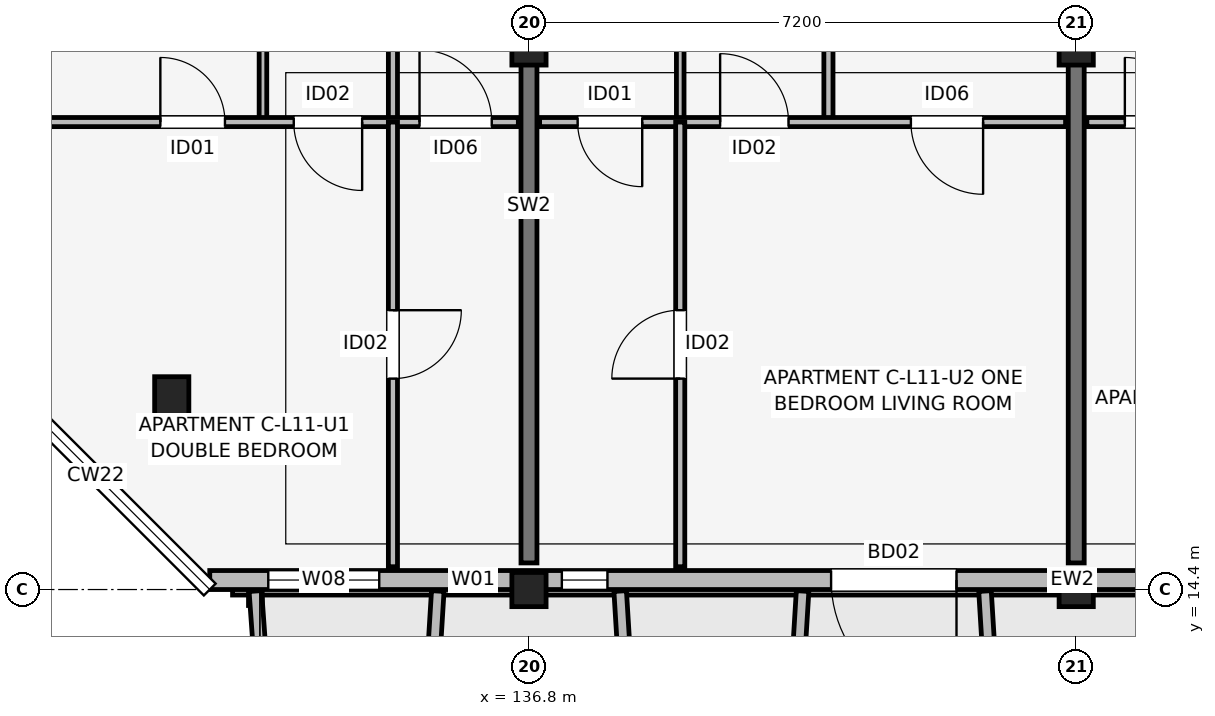
"""IFC4 building model, lengths in metres.
Left out: names, types, materials, properties, quantities, classifications, styles, units other than length and angle.
Written with IfcOpenShell. Run it as: python <this file> out.ifc"""

import sys

from ifc_helpers import new_model, si_unit, direction, frame, frame_2d, origin, origin_2d, place, context, subcontext, project, spatial, rectangle, extrude, element, fill, save


model = new_model("IFC4")
c1 = context("Model", 3, precision=1e-05, world=origin(), true_north=direction((0.0, 1.0)))
c2 = subcontext(c1, "Body", "Model", "MODEL_VIEW")
j1 = project(units=[si_unit("LENGTHUNIT", "METRE"), si_unit("PLANEANGLEUNIT", "RADIAN")], contexts=[c1])
p1 = place(None, origin())
s1 = spatial("IfcSite", under=j1, at=p1, CompositionType="ELEMENT")
p2 = place(p1, origin())
s2 = spatial("IfcBuilding", under=s1, at=p2, CompositionType="ELEMENT")
p3 = place(p2, frame((0.0, 0.0, 37.05)))
s3 = spatial("IfcBuildingStorey", under=s2, at=p3, CompositionType="ELEMENT", Elevation=37.05)
p4 = place(p3, frame((132.1, 16.9, 0.0), z_axis=(0.0, 0.0, 1.0), x_axis=(1.0, 0.0, 0.0)))
e1 = element("IfcColumn", 1, at=p4, inside=s3, PredefinedType="COLUMN", context=c2, shape_type="SweptSolid", body=[
    extrude(rectangle(XDim=0.45, YDim=0.6, at=origin_2d()), origin(), (0.0, 0.0, 1.0), 3.15),
])
p5 = place(p3, frame((136.8, 14.4, 0.0), z_axis=(0.0, 0.0, 1.0), x_axis=(1.0, 0.0, 0.0)))
e2 = element("IfcColumn", 2, at=p5, inside=s3, PredefinedType="COLUMN", context=c2, shape_type="SweptSolid", body=[
    extrude(rectangle(XDim=0.45, YDim=0.45, at=origin_2d()), origin(), (0.0, 0.0, 1.0), 3.15),
])
p6 = place(p3, frame((136.8, 21.6, 0.0), z_axis=(0.0, 0.0, 1.0), x_axis=(1.0, 0.0, 0.0)))
e3 = element("IfcColumn", 3, at=p6, inside=s3, PredefinedType="COLUMN", context=c2, shape_type="SweptSolid", body=[
    extrude(rectangle(XDim=0.45, YDim=0.6, at=origin_2d()), origin(), (0.0, 0.0, 1.0), 3.15),
])
p7 = place(p3, frame((144.0, 14.4, 0.0), z_axis=(0.0, 0.0, 1.0), x_axis=(1.0, 0.0, 0.0)))
e4 = element("IfcColumn", 4, at=p7, inside=s3, PredefinedType="COLUMN", context=c2, shape_type="SweptSolid", body=[
    extrude(rectangle(XDim=0.45, YDim=0.45, at=origin_2d()), origin(), (0.0, 0.0, 1.0), 3.15),
])
p8 = place(p3, frame((144.0, 21.6, 0.0), z_axis=(0.0, 0.0, 1.0), x_axis=(1.0, 0.0, 0.0)))
e5 = element("IfcColumn", 5, at=p8, inside=s3, PredefinedType="COLUMN", context=c2, shape_type="SweptSolid", body=[
    extrude(rectangle(XDim=0.45, YDim=0.6, at=origin_2d()), origin(), (0.0, 0.0, 1.0), 3.15),
])
for number, where, z_axis, x_axis in (
    (6, (136.8, 14.75, 0.0), (0.0, 0.0, 1.0), (0.0, 1.0, 0.0)),
    (7, (144.0, 14.75, 0.0), (0.0, 0.0, 1.0), (0.0, 1.0, 0.0)),
):
    element("IfcWall", number, at=place(p3, frame(where, z_axis=z_axis, x_axis=x_axis)), inside=s3, PredefinedType="SHEAR", context=c2, shape_type="SweptSolid", body=[
        extrude(rectangle(XDim=9.4, YDim=0.21, at=frame_2d((4.7, 0.0))), origin(), (0.0, 0.0, 1.0), 3.15),
    ])
p9 = place(p3, frame((132.6, 14.525, 0.0), z_axis=(0.0, 0.0, 1.0), x_axis=(1.0, 0.0, 0.0)))
e8 = element("IfcWall", 8, at=p9, inside=s3, PredefinedType="SOLIDWALL", context=c2, shape_type="SweptSolid", body=[
    extrude(rectangle(XDim=30.0, YDim=0.25, at=frame_2d((15.0, 0.0))), origin(), (0.0, 0.0, 1.0), 2.45),
])
p10 = place(p9, frame((9.825, 0.0, 0.0), z_axis=(0.0, 0.0, 1.0), x_axis=(-1.0, 0.0, 0.0)))
e9 = element("IfcOpeningElement", 9, at=p10, cuts=e8, PredefinedType="OPENING", context=c2, shape_type="SweptSolid", body=[
    extrude(rectangle(XDim=1.65, YDim=2.15, at=frame_2d((0.825, 1.075))), frame((0.0, 0.135, 0.0), z_axis=(0.0, -1.0, 0.0), x_axis=(1.0, 0.0, 0.0)), (0.0, 0.0, 1.0), 0.27),
])
p11 = place(p9, frame((24.15, 0.0, 0.0), z_axis=(0.0, 0.0, 1.0), x_axis=(-1.0, 0.0, 0.0)))
e10 = element("IfcOpeningElement", 10, at=p11, cuts=e8, PredefinedType="OPENING", context=c2, shape_type="SweptSolid", body=[
    extrude(rectangle(XDim=1.5, YDim=2.15, at=frame_2d((0.75, 1.075))), frame((0.0, 0.135, 0.0), z_axis=(0.0, -1.0, 0.0), x_axis=(1.0, 0.0, 0.0)), (0.0, 0.0, 1.0), 0.27),
])
p12 = place(p9, frame((0.77, 0.0, 0.7)))
e11 = element("IfcOpeningElement", 11, at=p12, cuts=e8, PredefinedType="OPENING", context=c2, shape_type="SweptSolid", body=[
    extrude(rectangle(XDim=1.46, YDim=1.55, at=frame_2d((0.73, 0.775))), frame((0.0, 0.135, 0.0), z_axis=(0.0, -1.0, 0.0), x_axis=(1.0, 0.0, 0.0)), (0.0, 0.0, 1.0), 0.27),
])
p13 = place(p9, frame((3.167, 0.0, 0.75)))
e12 = element("IfcOpeningElement", 12, at=p13, cuts=e8, PredefinedType="OPENING", context=c2, shape_type="SweptSolid", body=[
    extrude(rectangle(XDim=0.6, YDim=1.25, at=frame_2d((0.3, 0.625))), frame((0.0, 0.135, 0.0), z_axis=(0.0, -1.0, 0.0), x_axis=(1.0, 0.0, 0.0)), (0.0, 0.0, 1.0), 0.27),
])
p14 = place(p9, frame((4.633, 0.0, 0.75)))
e13 = element("IfcOpeningElement", 13, at=p14, cuts=e8, PredefinedType="OPENING", context=c2, shape_type="SweptSolid", body=[
    extrude(rectangle(XDim=0.6, YDim=1.25, at=frame_2d((0.3, 0.625))), frame((0.0, 0.135, 0.0), z_axis=(0.0, -1.0, 0.0), x_axis=(1.0, 0.0, 0.0)), (0.0, 0.0, 1.0), 0.27),
])
p15 = place(p9, frame((12.87, 0.0, 0.7)))
e14 = element("IfcOpeningElement", 14, at=p15, cuts=e8, PredefinedType="OPENING", context=c2, shape_type="SweptSolid", body=[
    extrude(rectangle(XDim=1.86, YDim=1.6, at=frame_2d((0.93, 0.8))), frame((0.0, 0.135, 0.0), z_axis=(0.0, -1.0, 0.0), x_axis=(1.0, 0.0, 0.0)), (0.0, 0.0, 1.0), 0.27),
])
p16 = place(p9, frame((16.165, 0.0, 0.75)))
e15 = element("IfcOpeningElement", 15, at=p16, cuts=e8, PredefinedType="OPENING", context=c2, shape_type="SweptSolid", body=[
    extrude(rectangle(XDim=0.72, YDim=1.35, at=frame_2d((0.36, 0.675))), frame((0.0, 0.135, 0.0), z_axis=(0.0, -1.0, 0.0), x_axis=(1.0, 0.0, 0.0)), (0.0, 0.0, 1.0), 0.27),
])
p17 = place(p9, frame((19.032, 0.0, 0.75)))
e16 = element("IfcOpeningElement", 16, at=p17, cuts=e8, PredefinedType="OPENING", context=c2, shape_type="SweptSolid", body=[
    extrude(rectangle(XDim=0.6, YDim=1.25, at=frame_2d((0.3, 0.625))), frame((0.0, 0.135, 0.0), z_axis=(0.0, -1.0, 0.0), x_axis=(1.0, 0.0, 0.0)), (0.0, 0.0, 1.0), 0.27),
])
p18 = place(p9, frame((26.232, 0.0, 0.75)))
e17 = element("IfcOpeningElement", 17, at=p18, cuts=e8, PredefinedType="OPENING", context=c2, shape_type="SweptSolid", body=[
    extrude(rectangle(XDim=0.6, YDim=1.25, at=frame_2d((0.3, 0.625))), frame((0.0, 0.135, 0.0), z_axis=(0.0, -1.0, 0.0), x_axis=(1.0, 0.0, 0.0)), (0.0, 0.0, 1.0), 0.27),
])
p19 = place(p9, frame((28.05, 0.0, 0.75)))
e18 = element("IfcOpeningElement", 18, at=p19, cuts=e8, PredefinedType="OPENING", context=c2, shape_type="SweptSolid", body=[
    extrude(rectangle(XDim=1.1, YDim=1.5, at=frame_2d((0.55, 0.75))), frame((0.0, 0.135, 0.0), z_axis=(0.0, -1.0, 0.0), x_axis=(1.0, 0.0, 0.0)), (0.0, 0.0, 1.0), 0.27),
])
p20 = place(p3, frame((133.2, 14.38, 0.0), z_axis=(0.0, 0.0, 1.0), x_axis=(0.071317687608, -0.997453651772, 0.0)))
e19 = element("IfcWall", 19, at=p20, inside=s3, PredefinedType="ELEMENTEDWALL", context=c2, shape_type="SweptSolid", body=[
    extrude(rectangle(XDim=1.965, YDim=0.165, at=frame_2d((0.982, 0.0))), origin(), (0.0, 0.0, 1.0), 2.95),
])
p21 = place(p3, frame((135.6, 14.38, 0.0), z_axis=(0.0, 0.0, 1.0), x_axis=(-0.061170732449, -0.998127317276, 0.0)))
e20 = element("IfcWall", 20, at=p21, inside=s3, PredefinedType="ELEMENTEDWALL", context=c2, shape_type="SweptSolid", body=[
    extrude(rectangle(XDim=1.964, YDim=0.165, at=frame_2d((0.982, 0.0))), origin(), (0.0, 0.0, 1.0), 2.95),
])
for number, where, z_axis, x_axis in (
    (21, (138.0, 14.38, 0.0), (0.0, 0.0, 1.0), (0.061, -0.998, 0.0)),
    (22, (140.4, 14.38, 0.0), (0.0, 0.0, 1.0), (-0.061, -0.998, 0.0)),
    (23, (142.8, 14.38, 0.0), (0.0, 0.0, 1.0), (0.061, -0.998, 0.0)),
):
    element("IfcWall", number, at=place(p3, frame(where, z_axis=z_axis, x_axis=x_axis)), inside=s3, PredefinedType="ELEMENTEDWALL", context=c2, shape_type="SweptSolid", body=[
        extrude(rectangle(XDim=1.964, YDim=0.165, at=frame_2d((0.982, 0.0))), origin(), (0.0, 0.0, 1.0), 2.55),
    ])
p22 = place(p3, frame((133.3, 20.55, 0.0), z_axis=(0.0, 0.0, 1.0), x_axis=(0.0, 1.0, 0.0)))
e24 = element("IfcWall", 24, at=p22, inside=s3, PredefinedType="PARTITIONING", context=c2, shape_type="SweptSolid", body=[
    extrude(rectangle(XDim=3.75, YDim=0.1, at=frame_2d((1.875, 0.0))), origin(), (0.0, 0.0, 1.0), 2.38),
])
p23 = place(p3, frame((135.01, 20.55, 0.0), z_axis=(0.0, 0.0, 1.0), x_axis=(0.0, 1.0, 0.0)))
e25 = element("IfcWall", 25, at=p23, inside=s3, PredefinedType="PARTITIONING", context=c2, shape_type="SweptSolid", body=[
    extrude(rectangle(XDim=3.75, YDim=0.12, at=frame_2d((1.875, 0.0))), origin(), (0.0, 0.0, 1.0), 2.38),
])
p24 = place(p3, frame((129.74, 20.55, 0.0), z_axis=(0.0, 0.0, 1.0), x_axis=(1.0, 0.0, 0.0)))
e26 = element("IfcWall", 26, at=p24, inside=s3, PredefinedType="PARTITIONING", context=c2, shape_type="SweptSolid", body=[
    extrude(rectangle(XDim=6.92, YDim=0.12, at=frame_2d((3.46, 0.0))), origin(), (0.0, 0.0, 1.0), 2.38),
])
p25 = place(p24, frame((2.21, 0.0, 0.0)))
e27 = element("IfcOpeningElement", 27, at=p25, cuts=e26, PredefinedType="OPENING", context=c2, shape_type="SweptSolid", body=[
    extrude(rectangle(XDim=0.85, YDim=2.08, at=frame_2d((0.425, 1.04))), frame((0.0, 0.07, 0.0), z_axis=(0.0, -1.0, 0.0), x_axis=(1.0, 0.0, 0.0)), (0.0, 0.0, 1.0), 0.14),
])
p26 = place(p24, frame((4.865, 0.0, 0.0), z_axis=(0.0, 0.0, 1.0), x_axis=(-1.0, 0.0, 0.0)))
e28 = element("IfcOpeningElement", 28, at=p26, cuts=e26, PredefinedType="OPENING", context=c2, shape_type="SweptSolid", body=[
    extrude(rectangle(XDim=0.9, YDim=2.08, at=frame_2d((0.45, 1.04))), frame((0.0, 0.07, 0.0), z_axis=(0.0, -1.0, 0.0), x_axis=(1.0, 0.0, 0.0)), (0.0, 0.0, 1.0), 0.14),
])
p27 = place(p24, frame((5.62, 0.0, 0.0)))
e29 = element("IfcOpeningElement", 29, at=p27, cuts=e26, PredefinedType="OPENING", context=c2, shape_type="SweptSolid", body=[
    extrude(rectangle(XDim=0.95, YDim=2.08, at=frame_2d((0.475, 1.04))), frame((0.0, 0.07, 0.0), z_axis=(0.0, -1.0, 0.0), x_axis=(1.0, 0.0, 0.0)), (0.0, 0.0, 1.0), 0.14),
])
p28 = place(p3, frame((135.01, 14.7, 0.0), z_axis=(0.0, 0.0, 1.0), x_axis=(0.0, 1.0, 0.0)))
e30 = element("IfcWall", 30, at=p28, inside=s3, PredefinedType="PARTITIONING", context=c2, shape_type="SweptSolid", body=[
    extrude(rectangle(XDim=5.85, YDim=0.12, at=frame_2d((2.925, 0.0))), origin(), (0.0, 0.0, 1.0), 2.38),
])
p29 = place(p28, frame((3.375, 0.0, 0.0), z_axis=(0.0, 0.0, 1.0), x_axis=(-1.0, 0.0, 0.0)))
e31 = element("IfcOpeningElement", 31, at=p29, cuts=e30, PredefinedType="OPENING", context=c2, shape_type="SweptSolid", body=[
    extrude(rectangle(XDim=0.9, YDim=2.08, at=frame_2d((0.45, 1.04))), frame((0.0, 0.07, 0.0), z_axis=(0.0, -1.0, 0.0), x_axis=(1.0, 0.0, 0.0)), (0.0, 0.0, 1.0), 0.14),
])
p30 = place(p3, frame((138.79, 20.55, 0.0), z_axis=(0.0, 0.0, 1.0), x_axis=(0.0, 1.0, 0.0)))
e32 = element("IfcWall", 32, at=p30, inside=s3, PredefinedType="PARTITIONING", context=c2, shape_type="SweptSolid", body=[
    extrude(rectangle(XDim=3.75, YDim=0.1, at=frame_2d((1.875, 0.0))), origin(), (0.0, 0.0, 1.0), 2.38),
])
p31 = place(p3, frame((140.74, 20.55, 0.0), z_axis=(0.0, 0.0, 1.0), x_axis=(0.0, 1.0, 0.0)))
e33 = element("IfcWall", 33, at=p31, inside=s3, PredefinedType="PARTITIONING", context=c2, shape_type="SweptSolid", body=[
    extrude(rectangle(XDim=3.75, YDim=0.12, at=frame_2d((1.875, 0.0))), origin(), (0.0, 0.0, 1.0), 2.38),
])
p32 = place(p3, frame((136.94, 20.55, 0.0), z_axis=(0.0, 0.0, 1.0), x_axis=(1.0, 0.0, 0.0)))
e34 = element("IfcWall", 34, at=p32, inside=s3, PredefinedType="PARTITIONING", context=c2, shape_type="SweptSolid", body=[
    extrude(rectangle(XDim=6.92, YDim=0.12, at=frame_2d((3.46, 0.0))), origin(), (0.0, 0.0, 1.0), 2.38),
])
p33 = place(p32, frame((1.35, 0.0, 0.0), z_axis=(0.0, 0.0, 1.0), x_axis=(-1.0, 0.0, 0.0)))
e35 = element("IfcOpeningElement", 35, at=p33, cuts=e34, PredefinedType="OPENING", context=c2, shape_type="SweptSolid", body=[
    extrude(rectangle(XDim=0.85, YDim=2.08, at=frame_2d((0.425, 1.04))), frame((0.0, 0.07, 0.0), z_axis=(0.0, -1.0, 0.0), x_axis=(1.0, 0.0, 0.0)), (0.0, 0.0, 1.0), 0.14),
])
p34 = place(p32, frame((2.375, 0.0, 0.0)))
e36 = element("IfcOpeningElement", 36, at=p34, cuts=e34, PredefinedType="OPENING", context=c2, shape_type="SweptSolid", body=[
    extrude(rectangle(XDim=0.9, YDim=2.08, at=frame_2d((0.45, 1.04))), frame((0.0, 0.07, 0.0), z_axis=(0.0, -1.0, 0.0), x_axis=(1.0, 0.0, 0.0)), (0.0, 0.0, 1.0), 0.14),
])
p35 = place(p32, frame((5.835, 0.0, 0.0), z_axis=(0.0, 0.0, 1.0), x_axis=(-1.0, 0.0, 0.0)))
e37 = element("IfcOpeningElement", 37, at=p35, cuts=e34, PredefinedType="OPENING", context=c2, shape_type="SweptSolid", body=[
    extrude(rectangle(XDim=0.95, YDim=2.08, at=frame_2d((0.475, 1.04))), frame((0.0, 0.07, 0.0), z_axis=(0.0, -1.0, 0.0), x_axis=(1.0, 0.0, 0.0)), (0.0, 0.0, 1.0), 0.14),
])
p36 = place(p3, frame((138.79, 14.7, 0.0), z_axis=(0.0, 0.0, 1.0), x_axis=(0.0, 1.0, 0.0)))
e38 = element("IfcWall", 38, at=p36, inside=s3, PredefinedType="PARTITIONING", context=c2, shape_type="SweptSolid", body=[
    extrude(rectangle(XDim=5.85, YDim=0.12, at=frame_2d((2.925, 0.0))), origin(), (0.0, 0.0, 1.0), 2.38),
])
p37 = place(p36, frame((2.475, 0.0, 0.0)))
e39 = element("IfcOpeningElement", 39, at=p37, cuts=e38, PredefinedType="OPENING", context=c2, shape_type="SweptSolid", body=[
    extrude(rectangle(XDim=0.9, YDim=2.08, at=frame_2d((0.45, 1.04))), frame((0.0, 0.07, 0.0), z_axis=(0.0, -1.0, 0.0), x_axis=(1.0, 0.0, 0.0)), (0.0, 0.0, 1.0), 0.14),
])
p38 = place(p3, frame((144.14, 20.55, 0.0), z_axis=(0.0, 0.0, 1.0), x_axis=(1.0, 0.0, 0.0)))
e40 = element("IfcWall", 40, at=p38, inside=s3, PredefinedType="PARTITIONING", context=c2, shape_type="SweptSolid", body=[
    extrude(rectangle(XDim=6.92, YDim=0.12, at=frame_2d((3.46, 0.0))), origin(), (0.0, 0.0, 1.0), 2.38),
])
p39 = place(p38, frame((0.5, 0.0, 0.0)))
e41 = element("IfcOpeningElement", 41, at=p39, cuts=e40, PredefinedType="OPENING", context=c2, shape_type="SweptSolid", body=[
    extrude(rectangle(XDim=0.85, YDim=2.08, at=frame_2d((0.425, 1.04))), frame((0.0, 0.07, 0.0), z_axis=(0.0, -1.0, 0.0), x_axis=(1.0, 0.0, 0.0)), (0.0, 0.0, 1.0), 0.14),
])
p40 = place(p38, frame((3.425, 0.0, 0.0), z_axis=(0.0, 0.0, 1.0), x_axis=(-1.0, 0.0, 0.0)))
e42 = element("IfcOpeningElement", 42, at=p40, cuts=e40, PredefinedType="OPENING", context=c2, shape_type="SweptSolid", body=[
    extrude(rectangle(XDim=0.9, YDim=2.08, at=frame_2d((0.45, 1.04))), frame((0.0, 0.07, 0.0), z_axis=(0.0, -1.0, 0.0), x_axis=(1.0, 0.0, 0.0)), (0.0, 0.0, 1.0), 0.14),
])
p41 = place(p38, frame((5.035, 0.0, 0.0)))
e43 = element("IfcOpeningElement", 43, at=p41, cuts=e40, PredefinedType="OPENING", context=c2, shape_type="SweptSolid", body=[
    extrude(rectangle(XDim=0.95, YDim=2.08, at=frame_2d((0.475, 1.04))), frame((0.0, 0.07, 0.0), z_axis=(0.0, -1.0, 0.0), x_axis=(1.0, 0.0, 0.0)), (0.0, 0.0, 1.0), 0.14),
])
p42 = place(p10, origin())
e44 = element("IfcDoor", 44, at=p42, inside=s3, OperationType="SINGLE_SWING_RIGHT", PredefinedType="DOOR", context=c2, shape_type="SweptSolid", body=[
    extrude(rectangle(XDim=1.65, YDim=2.15, at=frame_2d((0.825, 1.075))), frame((0.0, 0.025, 0.0), z_axis=(0.0, -1.0, 0.0), x_axis=(1.0, 0.0, 0.0)), (0.0, 0.0, 1.0), 0.05),
])
fill(e9, e44)
p43 = place(p12, origin())
e45 = element("IfcWindow", 45, at=p43, inside=s3, PartitioningType="SINGLE_PANEL", PredefinedType="WINDOW", context=c2, shape_type="SweptSolid", body=[
    extrude(rectangle(XDim=1.46, YDim=1.55, at=frame_2d((0.73, 0.775))), frame((0.0, 0.03, 0.0), z_axis=(0.0, -1.0, 0.0), x_axis=(1.0, 0.0, 0.0)), (0.0, 0.0, 1.0), 0.06),
])
fill(e11, e45)
p44 = place(p13, origin())
e46 = element("IfcWindow", 46, at=p44, inside=s3, PartitioningType="SINGLE_PANEL", PredefinedType="WINDOW", context=c2, shape_type="SweptSolid", body=[
    extrude(rectangle(XDim=0.6, YDim=1.25, at=frame_2d((0.3, 0.625))), frame((0.0, 0.03, 0.0), z_axis=(0.0, -1.0, 0.0), x_axis=(1.0, 0.0, 0.0)), (0.0, 0.0, 1.0), 0.06),
])
fill(e12, e46)
p45 = place(p14, origin())
e47 = element("IfcWindow", 47, at=p45, inside=s3, PartitioningType="SINGLE_PANEL", PredefinedType="WINDOW", context=c2, shape_type="SweptSolid", body=[
    extrude(rectangle(XDim=0.6, YDim=1.25, at=frame_2d((0.3, 0.625))), frame((0.0, 0.03, 0.0), z_axis=(0.0, -1.0, 0.0), x_axis=(1.0, 0.0, 0.0)), (0.0, 0.0, 1.0), 0.06),
])
fill(e13, e47)
p46 = place(p25, origin())
e48 = element("IfcDoor", 48, at=p46, inside=s3, OperationType="SINGLE_SWING_LEFT", PredefinedType="DOOR", context=c2, shape_type="SweptSolid", body=[
    extrude(rectangle(XDim=0.85, YDim=2.08, at=frame_2d((0.425, 1.04))), frame((0.0, 0.025, 0.0), z_axis=(0.0, -1.0, 0.0), x_axis=(1.0, 0.0, 0.0)), (0.0, 0.0, 1.0), 0.05),
])
fill(e27, e48)
p47 = place(p26, origin())
e49 = element("IfcDoor", 49, at=p47, inside=s3, OperationType="SINGLE_SWING_RIGHT", PredefinedType="DOOR", context=c2, shape_type="SweptSolid", body=[
    extrude(rectangle(XDim=0.9, YDim=2.08, at=frame_2d((0.45, 1.04))), frame((0.0, 0.025, 0.0), z_axis=(0.0, -1.0, 0.0), x_axis=(1.0, 0.0, 0.0)), (0.0, 0.0, 1.0), 0.05),
])
fill(e28, e49)
p48 = place(p27, origin())
e50 = element("IfcDoor", 50, at=p48, inside=s3, OperationType="SINGLE_SWING_LEFT", PredefinedType="DOOR", context=c2, shape_type="SweptSolid", body=[
    extrude(rectangle(XDim=0.95, YDim=2.08, at=frame_2d((0.475, 1.04))), frame((0.0, 0.025, 0.0), z_axis=(0.0, -1.0, 0.0), x_axis=(1.0, 0.0, 0.0)), (0.0, 0.0, 1.0), 0.05),
])
fill(e29, e50)
p49 = place(p29, origin())
e51 = element("IfcDoor", 51, at=p49, inside=s3, OperationType="SINGLE_SWING_RIGHT", PredefinedType="DOOR", context=c2, shape_type="SweptSolid", body=[
    extrude(rectangle(XDim=0.9, YDim=2.08, at=frame_2d((0.45, 1.04))), frame((0.0, 0.025, 0.0), z_axis=(0.0, -1.0, 0.0), x_axis=(1.0, 0.0, 0.0)), (0.0, 0.0, 1.0), 0.05),
])
fill(e31, e51)
p50 = place(p33, origin())
e52 = element("IfcDoor", 52, at=p50, inside=s3, OperationType="SINGLE_SWING_RIGHT", PredefinedType="DOOR", context=c2, shape_type="SweptSolid", body=[
    extrude(rectangle(XDim=0.85, YDim=2.08, at=frame_2d((0.425, 1.04))), frame((0.0, 0.025, 0.0), z_axis=(0.0, -1.0, 0.0), x_axis=(1.0, 0.0, 0.0)), (0.0, 0.0, 1.0), 0.05),
])
fill(e35, e52)
p51 = place(p34, origin())
e53 = element("IfcDoor", 53, at=p51, inside=s3, OperationType="SINGLE_SWING_LEFT", PredefinedType="DOOR", context=c2, shape_type="SweptSolid", body=[
    extrude(rectangle(XDim=0.9, YDim=2.08, at=frame_2d((0.45, 1.04))), frame((0.0, 0.025, 0.0), z_axis=(0.0, -1.0, 0.0), x_axis=(1.0, 0.0, 0.0)), (0.0, 0.0, 1.0), 0.05),
])
fill(e36, e53)
p52 = place(p35, origin())
e54 = element("IfcDoor", 54, at=p52, inside=s3, OperationType="SINGLE_SWING_RIGHT", PredefinedType="DOOR", context=c2, shape_type="SweptSolid", body=[
    extrude(rectangle(XDim=0.95, YDim=2.08, at=frame_2d((0.475, 1.04))), frame((0.0, 0.025, 0.0), z_axis=(0.0, -1.0, 0.0), x_axis=(1.0, 0.0, 0.0)), (0.0, 0.0, 1.0), 0.05),
])
fill(e37, e54)
p53 = place(p37, origin())
e55 = element("IfcDoor", 55, at=p53, inside=s3, OperationType="SINGLE_SWING_LEFT", PredefinedType="DOOR", context=c2, shape_type="SweptSolid", body=[
    extrude(rectangle(XDim=0.9, YDim=2.08, at=frame_2d((0.45, 1.04))), frame((0.0, 0.025, 0.0), z_axis=(0.0, -1.0, 0.0), x_axis=(1.0, 0.0, 0.0)), (0.0, 0.0, 1.0), 0.05),
])
fill(e39, e55)
p54 = place(p39, origin())
e56 = element("IfcDoor", 56, at=p54, inside=s3, OperationType="SINGLE_SWING_LEFT", PredefinedType="DOOR", context=c2, shape_type="SweptSolid", body=[
    extrude(rectangle(XDim=0.85, YDim=2.08, at=frame_2d((0.425, 1.04))), frame((0.0, 0.025, 0.0), z_axis=(0.0, -1.0, 0.0), x_axis=(1.0, 0.0, 0.0)), (0.0, 0.0, 1.0), 0.05),
])
fill(e41, e56)
save(model, sys.argv[1])
